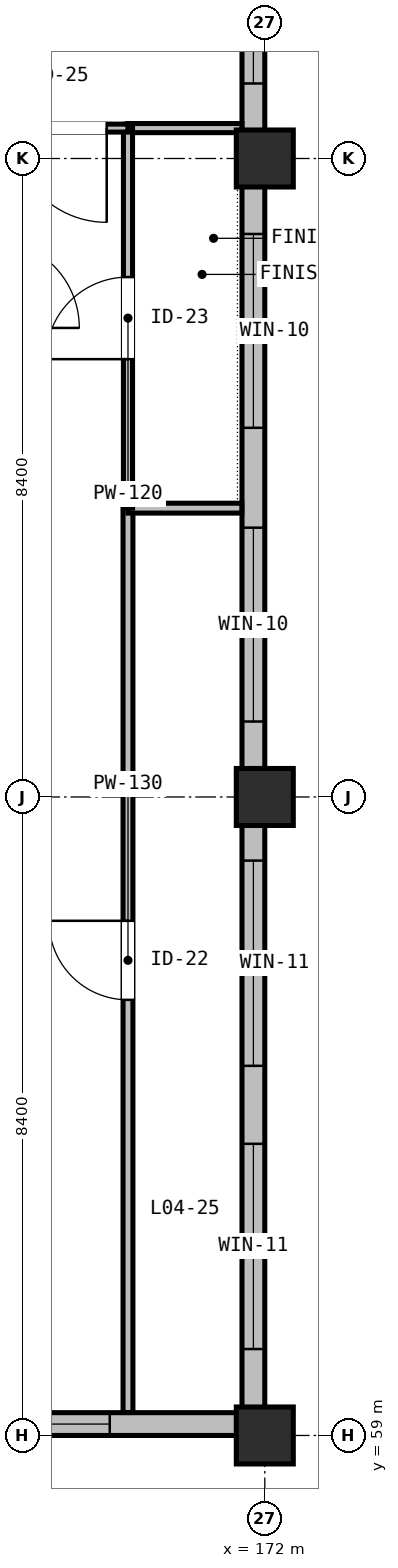
"""IFC4 building model, lengths in metres.
Left out: names, types, materials, properties, quantities, classifications, styles, units other than length and angle.
Written with IfcOpenShell. Run it as: python <this file> out.ifc"""

import sys

from ifc_helpers import new_model, si_unit, direction, frame, frame_2d, origin, origin_2d, place, context, subcontext, project, spatial, rectangle, extrude, element, fill, save


model = new_model("IFC4")
c1 = context("Model", 3, precision=1e-05, world=origin(), true_north=direction((0.0, 1.0)))
c2 = subcontext(c1, "Body", "Model", "MODEL_VIEW")
j1 = project(units=[si_unit("LENGTHUNIT", "METRE"), si_unit("PLANEANGLEUNIT", "RADIAN")], contexts=[c1])
p1 = place(None, origin())
s1 = spatial("IfcSite", under=j1, at=p1, CompositionType="ELEMENT")
p2 = place(p1, origin())
s2 = spatial("IfcBuilding", under=s1, at=p2, CompositionType="ELEMENT")
p3 = place(p2, frame((0.0, 0.0, 19.5)))
s3 = spatial("IfcBuildingStorey", under=s2, at=p3, CompositionType="ELEMENT", Elevation=19.5)
for number, where, z_axis, x_axis in (
    (1, (172.0, 59.0, 0.0), (0.0, 0.0, 1.0), (1.0, 0.0, 0.0)),
    (2, (172.0, 67.4, 0.0), (0.0, 0.0, 1.0), (1.0, 0.0, 0.0)),
    (3, (172.0, 75.8, 0.0), (0.0, 0.0, 1.0), (1.0, 0.0, 0.0)),
):
    element("IfcColumn", number, at=place(p3, frame(where, z_axis=z_axis, x_axis=x_axis)), inside=s3, PredefinedType="COLUMN", context=c2, shape_type="SweptSolid", body=[
        extrude(rectangle(XDim=0.75, YDim=0.75, at=origin_2d()), origin(), (0.0, 0.0, 1.0), 4.5),
    ])
p4 = place(p3, frame((171.85, 83.9, 0.0), z_axis=(0.0, 0.0, 1.0), x_axis=(0.0, -1.0, 0.0)))
e4 = element("IfcWall", 4, at=p4, inside=s3, PredefinedType="STANDARD", context=c2, shape_type="SweptSolid", body=[
    extrude(rectangle(XDim=8.1, YDim=0.3, at=frame_2d((4.05, 0.0))), origin(), (0.0, 0.0, 1.0), 3.885),
])
p5 = place(p4, frame((0.987, 0.0, 0.9)))
e5 = element("IfcOpeningElement", 5, at=p5, cuts=e4, PredefinedType="OPENING", context=c2, shape_type="SweptSolid", body=[
    extrude(rectangle(XDim=2.4, YDim=2.1, at=frame_2d((1.2, 1.05))), frame((0.0, 0.16, 0.0), z_axis=(0.0, -1.0, 0.0), x_axis=(1.0, 0.0, 0.0)), (0.0, 0.0, 1.0), 0.32),
])
p6 = place(p4, frame((4.713, 0.0, 0.9)))
e6 = element("IfcOpeningElement", 6, at=p6, cuts=e4, PredefinedType="OPENING", context=c2, shape_type="SweptSolid", body=[
    extrude(rectangle(XDim=2.4, YDim=2.1, at=frame_2d((1.2, 1.05))), frame((0.0, 0.16, 0.0), z_axis=(0.0, -1.0, 0.0), x_axis=(1.0, 0.0, 0.0)), (0.0, 0.0, 1.0), 0.32),
])
p7 = place(p3, frame((171.85, 75.8, 0.0), z_axis=(0.0, 0.0, 1.0), x_axis=(0.0, -1.0, 0.0)))
e7 = element("IfcWall", 7, at=p7, inside=s3, PredefinedType="STANDARD", context=c2, shape_type="SweptSolid", body=[
    extrude(rectangle(XDim=8.4, YDim=0.3, at=frame_2d((4.2, 0.0))), origin(), (0.0, 0.0, 1.0), 3.885),
])
p8 = place(p7, frame((0.993, 0.0, 0.75)))
e8 = element("IfcOpeningElement", 8, at=p8, cuts=e7, PredefinedType="OPENING", context=c2, shape_type="SweptSolid", body=[
    extrude(rectangle(XDim=2.55, YDim=2.15, at=frame_2d((1.275, 1.075))), frame((0.0, 0.16, 0.0), z_axis=(0.0, -1.0, 0.0), x_axis=(1.0, 0.0, 0.0)), (0.0, 0.0, 1.0), 0.32),
])
p9 = place(p7, frame((4.857, 0.0, 0.75)))
e9 = element("IfcOpeningElement", 9, at=p9, cuts=e7, PredefinedType="OPENING", context=c2, shape_type="SweptSolid", body=[
    extrude(rectangle(XDim=2.55, YDim=2.15, at=frame_2d((1.275, 1.075))), frame((0.0, 0.16, 0.0), z_axis=(0.0, -1.0, 0.0), x_axis=(1.0, 0.0, 0.0)), (0.0, 0.0, 1.0), 0.32),
])
p10 = place(p3, frame((171.85, 67.4, 0.0), z_axis=(0.0, 0.0, 1.0), x_axis=(0.0, -1.0, 0.0)))
e10 = element("IfcWall", 10, at=p10, inside=s3, PredefinedType="STANDARD", context=c2, shape_type="SweptSolid", body=[
    extrude(rectangle(XDim=8.1, YDim=0.3, at=frame_2d((4.05, 0.0))), origin(), (0.0, 0.0, 1.0), 3.885),
])
p11 = place(p10, frame((0.837, 0.0, 0.75)))
e11 = element("IfcOpeningElement", 11, at=p11, cuts=e10, PredefinedType="OPENING", context=c2, shape_type="SweptSolid", body=[
    extrude(rectangle(XDim=2.7, YDim=2.2, at=frame_2d((1.35, 1.1))), frame((0.0, 0.16, 0.0), z_axis=(0.0, -1.0, 0.0), x_axis=(1.0, 0.0, 0.0)), (0.0, 0.0, 1.0), 0.32),
])
p12 = place(p10, frame((4.563, 0.0, 0.75)))
e12 = element("IfcOpeningElement", 12, at=p12, cuts=e10, PredefinedType="OPENING", context=c2, shape_type="SweptSolid", body=[
    extrude(rectangle(XDim=2.7, YDim=2.2, at=frame_2d((1.35, 1.1))), frame((0.0, 0.16, 0.0), z_axis=(0.0, -1.0, 0.0), x_axis=(1.0, 0.0, 0.0)), (0.0, 0.0, 1.0), 0.32),
])
p13 = place(p3, frame((172.0, 59.15, 0.0), z_axis=(0.0, 0.0, 1.0), x_axis=(-1.0, 0.0, 0.0)))
e13 = element("IfcWall", 13, at=p13, inside=s3, PredefinedType="STANDARD", context=c2, shape_type="SweptSolid", body=[
    extrude(rectangle(XDim=6.8, YDim=0.3, at=frame_2d((3.4, 0.0))), origin(), (0.0, 0.0, 1.0), 3.735),
])
p14 = place(p13, frame((2.04, 0.0, 0.75)))
e14 = element("IfcOpeningElement", 14, at=p14, cuts=e13, PredefinedType="OPENING", context=c2, shape_type="SweptSolid", body=[
    extrude(rectangle(XDim=2.9, YDim=2.2, at=frame_2d((1.45, 1.1))), frame((0.0, 0.16, 0.0), z_axis=(0.0, -1.0, 0.0), x_axis=(1.0, 0.0, 0.0)), (0.0, 0.0, 1.0), 0.32),
])
p15 = place(p3, frame((170.2, 59.302, 0.0), z_axis=(0.0, 0.0, 1.0), x_axis=(0.0, 1.0, 0.0)))
e15 = element("IfcWall", 15, at=p15, inside=s3, PredefinedType="PARTITIONING", context=c2, shape_type="SweptSolid", body=[
    extrude(rectangle(XDim=11.898, YDim=0.13, at=frame_2d((5.949, 0.0))), origin(), (0.0, 0.0, 1.0), 3.885),
])
p16 = place(p15, frame((5.429, 0.0, 0.0)))
e16 = element("IfcOpeningElement", 16, at=p16, cuts=e15, PredefinedType="OPENING", context=c2, shape_type="SweptSolid", body=[
    extrude(rectangle(XDim=1.04, YDim=2.14, at=frame_2d((0.52, 1.07))), frame((0.0, 0.075, 0.0), z_axis=(0.0, -1.0, 0.0), x_axis=(1.0, 0.0, 0.0)), (0.0, 0.0, 1.0), 0.15),
])
p17 = place(p3, frame((170.2, 71.2, 0.0), z_axis=(0.0, 0.0, 1.0), x_axis=(1.0, 0.0, 0.0)))
e17 = element("IfcWall", 17, at=p17, inside=s3, PredefinedType="PARTITIONING", context=c2, shape_type="SweptSolid", body=[
    extrude(rectangle(XDim=1.498, YDim=0.13, at=frame_2d((0.749, 0.0))), origin(), (0.0, 0.0, 1.0), 4.195),
])
p18 = place(p3, frame((170.2, 76.2, 0.0), z_axis=(0.0, 0.0, 1.0), x_axis=(1.0, 0.0, 0.0)))
e18 = element("IfcWall", 18, at=p18, inside=s3, PredefinedType="PARTITIONING", context=c2, shape_type="SweptSolid", body=[
    extrude(rectangle(XDim=1.498, YDim=0.12, at=frame_2d((0.749, 0.0))), origin(), (0.0, 0.0, 1.0), 4.195),
])
p19 = place(p3, frame((170.2, 71.2, 0.0), z_axis=(0.0, 0.0, 1.0), x_axis=(0.0, 1.0, 0.0)))
e19 = element("IfcWall", 19, at=p19, inside=s3, PredefinedType="PARTITIONING", context=c2, shape_type="SweptSolid", body=[
    extrude(rectangle(XDim=5.0, YDim=0.12, at=frame_2d((2.5, 0.0))), origin(), (0.0, 0.0, 1.0), 3.885),
])
p20 = place(p19, frame((1.96, 0.0, 0.0)))
e20 = element("IfcOpeningElement", 20, at=p20, cuts=e19, PredefinedType="OPENING", context=c2, shape_type="SweptSolid", body=[
    extrude(rectangle(XDim=1.08, YDim=2.14, at=frame_2d((0.54, 1.07))), frame((0.0, 0.07, 0.0), z_axis=(0.0, -1.0, 0.0), x_axis=(1.0, 0.0, 0.0)), (0.0, 0.0, 1.0), 0.14),
])
p21 = place(p3, frame((170.2, 76.2, 0.0), z_axis=(0.0, 0.0, 1.0), x_axis=(-1.0, 0.0, 0.0)))
e21 = element("IfcWall", 21, at=p21, inside=s3, PredefinedType="PARTITIONING", context=c2, shape_type="SweptSolid", body=[
    extrude(rectangle(XDim=1.8, YDim=0.105, at=frame_2d((0.9, 0.0))), origin(), (0.0, 0.0, 1.0), 3.985),
])
p22 = place(p21, frame((0.28, 0.0, 0.0)))
e22 = element("IfcOpeningElement", 22, at=p22, cuts=e21, PredefinedType="OPENING", context=c2, shape_type="SweptSolid", body=[
    extrude(rectangle(XDim=1.24, YDim=2.14, at=frame_2d((0.62, 1.07))), frame((0.0, 0.062, 0.0), z_axis=(0.0, -1.0, 0.0), x_axis=(1.0, 0.0, 0.0)), (0.0, 0.0, 1.0), 0.125),
])
p23 = place(p6, origin())
e23 = element("IfcWindow", 23, at=p23, inside=s3, PartitioningType="SINGLE_PANEL", PredefinedType="WINDOW", context=c2, shape_type="SweptSolid", body=[
    extrude(rectangle(XDim=2.4, YDim=2.1, at=frame_2d((1.2, 1.05))), frame((0.0, 0.03, 0.0), z_axis=(0.0, -1.0, 0.0), x_axis=(1.0, 0.0, 0.0)), (0.0, 0.0, 1.0), 0.06),
])
fill(e6, e23)
p24 = place(p8, origin())
e24 = element("IfcWindow", 24, at=p24, inside=s3, PartitioningType="SINGLE_PANEL", PredefinedType="WINDOW", context=c2, shape_type="SweptSolid", body=[
    extrude(rectangle(XDim=2.55, YDim=2.15, at=frame_2d((1.275, 1.075))), frame((0.0, 0.03, 0.0), z_axis=(0.0, -1.0, 0.0), x_axis=(1.0, 0.0, 0.0)), (0.0, 0.0, 1.0), 0.06),
])
fill(e8, e24)
p25 = place(p9, origin())
e25 = element("IfcWindow", 25, at=p25, inside=s3, PartitioningType="SINGLE_PANEL", PredefinedType="WINDOW", context=c2, shape_type="SweptSolid", body=[
    extrude(rectangle(XDim=2.55, YDim=2.15, at=frame_2d((1.275, 1.075))), frame((0.0, 0.03, 0.0), z_axis=(0.0, -1.0, 0.0), x_axis=(1.0, 0.0, 0.0)), (0.0, 0.0, 1.0), 0.06),
])
fill(e9, e25)
p26 = place(p11, origin())
e26 = element("IfcWindow", 26, at=p26, inside=s3, PartitioningType="SINGLE_PANEL", PredefinedType="WINDOW", context=c2, shape_type="SweptSolid", body=[
    extrude(rectangle(XDim=2.7, YDim=2.2, at=frame_2d((1.35, 1.1))), frame((0.0, 0.03, 0.0), z_axis=(0.0, -1.0, 0.0), x_axis=(1.0, 0.0, 0.0)), (0.0, 0.0, 1.0), 0.06),
])
fill(e11, e26)
p27 = place(p12, origin())
e27 = element("IfcWindow", 27, at=p27, inside=s3, PartitioningType="SINGLE_PANEL", PredefinedType="WINDOW", context=c2, shape_type="SweptSolid", body=[
    extrude(rectangle(XDim=2.7, YDim=2.2, at=frame_2d((1.35, 1.1))), frame((0.0, 0.03, 0.0), z_axis=(0.0, -1.0, 0.0), x_axis=(1.0, 0.0, 0.0)), (0.0, 0.0, 1.0), 0.06),
])
fill(e12, e27)
p28 = place(p14, origin())
e28 = element("IfcWindow", 28, at=p28, inside=s3, PartitioningType="SINGLE_PANEL", PredefinedType="WINDOW", context=c2, shape_type="SweptSolid", body=[
    extrude(rectangle(XDim=2.9, YDim=2.2, at=frame_2d((1.45, 1.1))), frame((0.0, 0.03, 0.0), z_axis=(0.0, -1.0, 0.0), x_axis=(1.0, 0.0, 0.0)), (0.0, 0.0, 1.0), 0.06),
])
fill(e14, e28)
p29 = place(p16, origin())
e29 = element("IfcDoor", 29, at=p29, inside=s3, OperationType="SINGLE_SWING_RIGHT", PredefinedType="DOOR", context=c2, shape_type="SweptSolid", body=[
    extrude(rectangle(XDim=1.04, YDim=2.14, at=frame_2d((0.52, 1.07))), frame((0.0, 0.025, 0.0), z_axis=(0.0, -1.0, 0.0), x_axis=(1.0, 0.0, 0.0)), (0.0, 0.0, 1.0), 0.05),
])
fill(e16, e29)
p30 = place(p20, origin())
e30 = element("IfcDoor", 30, at=p30, inside=s3, OperationType="SINGLE_SWING_LEFT", PredefinedType="DOOR", context=c2, shape_type="SweptSolid", body=[
    extrude(rectangle(XDim=1.08, YDim=2.14, at=frame_2d((0.54, 1.07))), frame((0.0, 0.025, 0.0), z_axis=(0.0, -1.0, 0.0), x_axis=(1.0, 0.0, 0.0)), (0.0, 0.0, 1.0), 0.05),
])
fill(e20, e30)
p31 = place(p22, origin())
e31 = element("IfcDoor", 31, at=p31, inside=s3, OperationType="SINGLE_SWING_LEFT", PredefinedType="DOOR", context=c2, shape_type="SweptSolid", body=[
    extrude(rectangle(XDim=1.24, YDim=2.14, at=frame_2d((0.62, 1.07))), frame((0.0, 0.025, 0.0), z_axis=(0.0, -1.0, 0.0), x_axis=(1.0, 0.0, 0.0)), (0.0, 0.0, 1.0), 0.05),
])
fill(e22, e31)
save(model, sys.argv[1])
